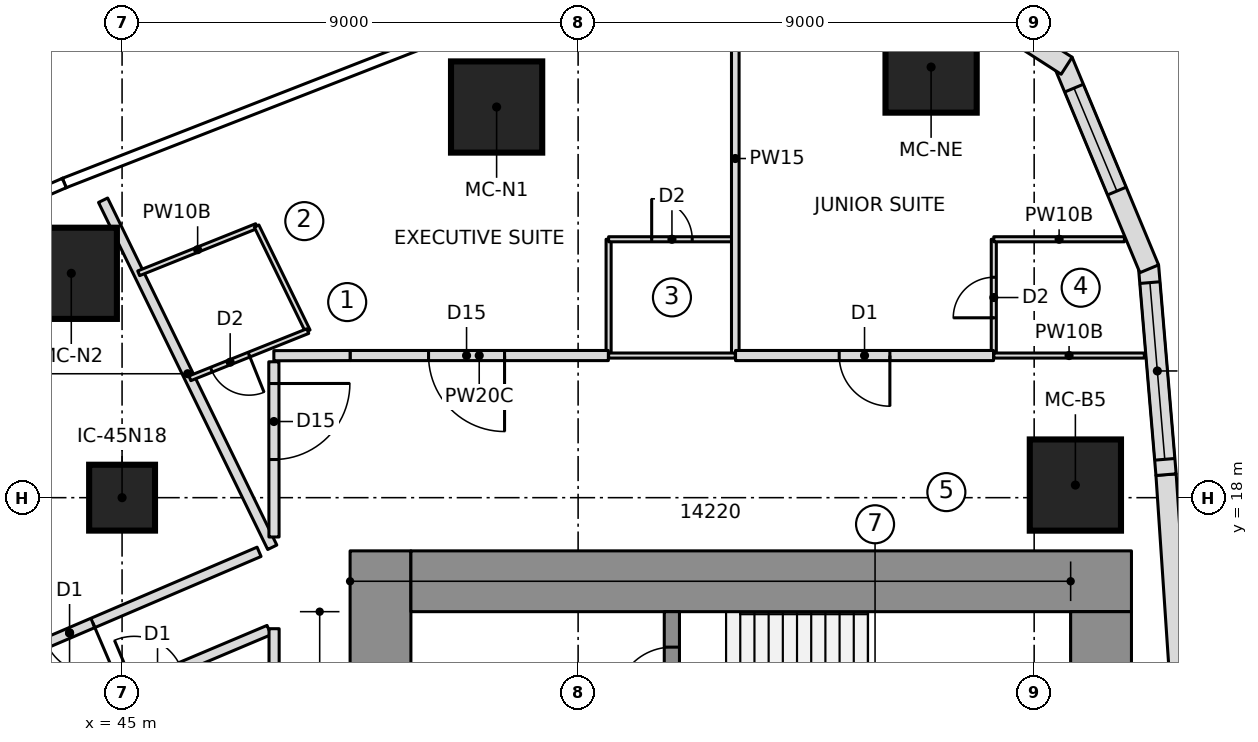
"""IFC4 building model, lengths in metres.
Left out: names, types, materials, properties, quantities, classifications, styles, units other than length and angle.
Written with IfcOpenShell. Run it as: python <this file> out.ifc"""

import sys

from ifc_helpers import new_model, si_unit, direction, frame, frame_2d, origin, origin_2d, place, context, subcontext, project, spatial, polyline, rectangle, outline, extrude, element, fill, save


model = new_model("IFC4")
c1 = context("Model", 3, precision=1e-05, world=origin(), true_north=direction((0.0, 1.0)))
c2 = subcontext(c1, "Body", "Model", "MODEL_VIEW")
j1 = project(units=[si_unit("LENGTHUNIT", "METRE"), si_unit("PLANEANGLEUNIT", "RADIAN")], contexts=[c1])
p1 = place(None, origin())
s1 = spatial("IfcSite", under=j1, at=p1, CompositionType="ELEMENT")
p2 = place(p1, origin())
s2 = spatial("IfcBuilding", under=s1, at=p2, CompositionType="ELEMENT")
p3 = place(p2, frame((0.0, 0.0, 53.8)))
s3 = spatial("IfcBuildingStorey", under=s2, at=p3, CompositionType="ELEMENT", Elevation=53.8)
p4 = place(p3, frame((50.1, 6.65, 0.0), z_axis=(0.0, 0.0, 1.0), x_axis=(0.0, 1.0, 0.0)))
e1 = element("IfcWall", 1, at=p4, inside=s3, PredefinedType="SHEAR", context=c2, shape_type="SweptSolid", body=[
    extrude(rectangle(XDim=10.3, YDim=1.2, at=frame_2d((5.15, 0.0))), origin(), (0.0, 0.0, 1.0), 3.55),
])
p5 = place(p4, frame((6.5, 0.0, 0.0)))
e2 = element("IfcOpeningElement", 2, at=p5, cuts=e1, PredefinedType="OPENING", context=c2, shape_type="SweptSolid", body=[
    extrude(rectangle(XDim=1.1, YDim=2.1, at=frame_2d((0.55, 1.05))), frame((0.0, 0.61, 0.0), z_axis=(0.0, -1.0, 0.0), x_axis=(1.0, 0.0, 0.0)), (0.0, 0.0, 1.0), 1.22),
])
p6 = place(p3, frame((50.7, 16.35, 0.0), z_axis=(0.0, 0.0, 1.0), x_axis=(1.0, 0.0, 0.0)))
e3 = element("IfcWall", 3, at=p6, inside=s3, PredefinedType="SHEAR", context=c2, shape_type="SweptSolid", body=[
    extrude(rectangle(XDim=14.22, YDim=1.2, at=frame_2d((7.11, 0.0))), origin(), (0.0, 0.0, 1.0), 3.55),
])
p7 = place(p3, frame((64.32, 9.95, 0.0), z_axis=(0.0, 0.0, 1.0), x_axis=(0.0, 1.0, 0.0)))
e4 = element("IfcWall", 4, at=p7, inside=s3, PredefinedType="SHEAR", context=c2, shape_type="SweptSolid", body=[
    extrude(rectangle(XDim=5.8, YDim=1.2, at=frame_2d((2.9, 0.0))), origin(), (0.0, 0.0, 1.0), 3.55),
])
p8 = place(p3, frame((55.85, 10.35, 0.0), z_axis=(0.0, 0.0, 1.0), x_axis=(0.0, 1.0, 0.0)))
e5 = element("IfcWall", 5, at=p8, inside=s3, PredefinedType="SHEAR", context=c2, shape_type="SweptSolid", body=[
    extrude(rectangle(XDim=5.4, YDim=0.3, at=frame_2d((2.7, 0.0))), origin(), (0.0, 0.0, 1.0), 3.55),
])
p9 = place(p8, frame((1.43, 0.0, 0.0)))
e6 = element("IfcOpeningElement", 6, at=p9, cuts=e5, PredefinedType="OPENING", context=c2, shape_type="SweptSolid", body=[
    extrude(rectangle(XDim=1.1, YDim=2.1, at=frame_2d((0.55, 1.05))), frame((0.0, 0.16, 0.0), z_axis=(0.0, -1.0, 0.0), x_axis=(1.0, 0.0, 0.0)), (0.0, 0.0, 1.0), 0.32),
])
p10 = place(p8, frame((3.6, 0.0, 0.0)))
e7 = element("IfcOpeningElement", 7, at=p10, cuts=e5, PredefinedType="OPENING", context=c2, shape_type="SweptSolid", body=[
    extrude(rectangle(XDim=1.1, YDim=2.1, at=frame_2d((0.55, 1.05))), frame((0.0, 0.16, 0.0), z_axis=(0.0, -1.0, 0.0), x_axis=(1.0, 0.0, 0.0)), (0.0, 0.0, 1.0), 0.32),
])
for number, where, z_axis, x_axis in (
    (8, (63.813, 18.249, 0.0), (0.0, 0.0, 1.0), (1.0, 0.0, 0.0)),
    (9, (60.966, 26.499, 0.0), (0.0, 0.0, 1.0), (1.0, 0.0, 0.0)),
    (10, (52.392, 25.71, 0.0), (0.0, 0.0, 1.0), (1.0, 0.0, 0.0)),
    (11, (43.998, 22.428, 0.0), (0.0, 0.0, 1.0), (1.0, 0.0, 0.0)),
):
    element("IfcColumn", number, at=place(p3, frame(where, z_axis=z_axis, x_axis=x_axis)), inside=s3, PredefinedType="COLUMN", context=c2, shape_type="SweptSolid", body=[
        extrude(rectangle(XDim=1.8, YDim=1.8, at=origin_2d()), origin(), (0.0, 0.0, 1.0), 3.55),
    ])
p11 = place(p3, frame((45.0, 18.0, 0.0), z_axis=(0.0, 0.0, 1.0), x_axis=(1.0, 0.0, 0.0)))
e12 = element("IfcColumn", 12, at=p11, inside=s3, PredefinedType="COLUMN", context=c2, shape_type="SweptSolid", body=[
    extrude(rectangle(XDim=1.3, YDim=1.3, at=origin_2d()), origin(), (0.0, 0.0, 1.0), 3.55),
])
p12 = place(p3, frame((65.878, 14.36, 0.0), z_axis=(0.0, 0.0, 1.0), x_axis=(-0.067087430225, 0.997747100575, 0.0)))
e13 = element("IfcWall", 13, at=p12, inside=s3, PredefinedType="NOTDEFINED", context=c2, shape_type="SweptSolid", body=[
    extrude(outline(polyline([(-0.002, -0.2), (4.107, -0.2), (4.103, 0.2), (0.002, 0.2), (-0.002, -0.2)])), origin(), (0.0, 0.0, 1.0), 3.25),
])
p13 = place(p3, frame((65.603, 18.455, 0.0), z_axis=(0.0, 0.0, 1.0), x_axis=(-0.083793550906, 0.996483136248, 0.0)))
e14 = element("IfcWall", 14, at=p13, inside=s3, PredefinedType="NOTDEFINED", context=c2, shape_type="SweptSolid", body=[
    extrude(outline(polyline([(-0.002, -0.2), (4.136, -0.2), (4.074, 0.2), (0.002, 0.2), (-0.002, -0.2)])), origin(), (0.0, 0.0, 1.0), 3.25),
])
p14 = place(p13, frame((0.302, 0.0, 0.9)))
e15 = element("IfcOpeningElement", 15, at=p14, cuts=e14, PredefinedType="OPENING", context=c2, shape_type="SweptSolid", body=[
    extrude(rectangle(XDim=3.5, YDim=1.8, at=frame_2d((1.75, 0.9))), frame((0.0, 0.21, 0.0), z_axis=(0.0, -1.0, 0.0), x_axis=(1.0, 0.0, 0.0)), (0.0, 0.0, 1.0), 0.42),
])
p15 = place(p3, frame((65.259, 22.546, 0.0), z_axis=(0.0, 0.0, 1.0), x_axis=(-0.384372042685, 0.923178277908, 0.0)))
e16 = element("IfcWall", 16, at=p15, inside=s3, PredefinedType="NOTDEFINED", context=c2, shape_type="SweptSolid", body=[
    extrude(outline(polyline([(-0.031, -0.2), (4.408, -0.2), (4.283, 0.2), (0.031, 0.2), (-0.031, -0.2)])), origin(), (0.0, 0.0, 1.0), 3.25),
])
p16 = place(p15, frame((1.631, 0.0, 0.6)))
e17 = element("IfcOpeningElement", 17, at=p16, cuts=e16, PredefinedType="OPENING", context=c2, shape_type="SweptSolid", body=[
    extrude(outline(polyline([(0.0, 1.35), (0.084, 1.771), (0.322, 2.128), (0.679, 2.366), (1.1, 2.45), (1.521, 2.366), (1.878, 2.128), (2.116, 1.771), (2.2, 1.35), (2.2, 1.1), (2.116, 0.679), (1.878, 0.322), (1.521, 0.084), (1.1, 0.0), (0.679, 0.084), (0.322, 0.322), (0.084, 0.679), (0.0, 1.1), (0.0, 1.35)])), frame((0.0, 0.21, 0.0), z_axis=(0.0, -1.0, 0.0), x_axis=(1.0, 0.0, 0.0)), (0.0, 0.0, 1.0), 0.42),
])
p17 = place(p3, frame((63.588, 26.558, 0.0), z_axis=(0.0, 0.0, 1.0), x_axis=(-0.840937468718, 0.541132307025, 0.0)))
e18 = element("IfcWall", 18, at=p17, inside=s3, PredefinedType="NOTDEFINED", context=c2, shape_type="SweptSolid", body=[
    extrude(outline(polyline([(-0.062, -0.2), (4.409, -0.2), (4.284, 0.2), (0.062, 0.2), (-0.062, -0.2)])), origin(), (0.0, 0.0, 1.0), 3.25),
])
p18 = place(p17, frame((1.073, 0.0, 0.6)))
e19 = element("IfcOpeningElement", 19, at=p18, cuts=e18, PredefinedType="OPENING", context=c2, shape_type="SweptSolid", body=[
    extrude(outline(polyline([(0.0, 1.35), (0.084, 1.771), (0.322, 2.128), (0.679, 2.366), (1.1, 2.45), (1.521, 2.366), (1.878, 2.128), (2.116, 1.771), (2.2, 1.35), (2.2, 1.1), (2.116, 0.679), (1.878, 0.322), (1.521, 0.084), (1.1, 0.0), (0.679, 0.084), (0.322, 0.322), (0.084, 0.679), (0.0, 1.1), (0.0, 1.35)])), frame((0.0, 0.21, 0.0), z_axis=(0.0, -1.0, 0.0), x_axis=(1.0, 0.0, 0.0)), (0.0, 0.0, 1.0), 0.42),
])
p19 = place(p3, frame((54.602, 20.8, 0.0), z_axis=(0.0, 0.0, 1.0), x_axis=(0.0, 1.0, 0.0)))
e20 = element("IfcWall", 20, at=p19, inside=s3, PredefinedType="PARTITIONING", context=c2, shape_type="SweptSolid", body=[
    extrude(rectangle(XDim=2.3, YDim=0.1, at=frame_2d((1.15, 0.0))), origin(), (0.0, 0.0, 1.0), 3.25),
])
p20 = place(p3, frame((54.602, 23.1, 0.0), z_axis=(0.0, 0.0, 1.0), x_axis=(1.0, 0.0, 0.0)))
e21 = element("IfcWall", 21, at=p20, inside=s3, PredefinedType="PARTITIONING", context=c2, shape_type="SweptSolid", body=[
    extrude(rectangle(XDim=2.5, YDim=0.1, at=frame_2d((1.25, 0.0))), origin(), (0.0, 0.0, 1.0), 3.25),
])
p21 = place(p20, frame((0.85, 0.0, 0.0)))
e22 = element("IfcOpeningElement", 22, at=p21, cuts=e21, PredefinedType="OPENING", context=c2, shape_type="SweptSolid", body=[
    extrude(rectangle(XDim=0.8, YDim=2.1, at=frame_2d((0.4, 1.05))), frame((0.0, 0.06, 0.0), z_axis=(0.0, -1.0, 0.0), x_axis=(1.0, 0.0, 0.0)), (0.0, 0.0, 1.0), 0.12),
])
p22 = place(p3, frame((62.203, 20.8, 0.0), z_axis=(0.0, 0.0, 1.0), x_axis=(0.0, 1.0, 0.0)))
e23 = element("IfcWall", 23, at=p22, inside=s3, PredefinedType="PARTITIONING", context=c2, shape_type="SweptSolid", body=[
    extrude(rectangle(XDim=2.3, YDim=0.1, at=frame_2d((1.15, 0.0))), origin(), (0.0, 0.0, 1.0), 3.25),
])
p23 = place(p22, frame((0.75, 0.0, 0.0)))
e24 = element("IfcOpeningElement", 24, at=p23, cuts=e23, PredefinedType="OPENING", context=c2, shape_type="SweptSolid", body=[
    extrude(rectangle(XDim=0.8, YDim=2.1, at=frame_2d((0.4, 1.05))), frame((0.0, 0.06, 0.0), z_axis=(0.0, -1.0, 0.0), x_axis=(1.0, 0.0, 0.0)), (0.0, 0.0, 1.0), 0.12),
])
p24 = place(p3, frame((62.203, 23.1, 0.0), z_axis=(0.0, 0.0, 1.0), x_axis=(1.0, 0.0, 0.0)))
e25 = element("IfcWall", 25, at=p24, inside=s3, PredefinedType="PARTITIONING", context=c2, shape_type="SweptSolid", body=[
    extrude(rectangle(XDim=2.578, YDim=0.1, at=frame_2d((1.289, 0.0))), origin(), (0.0, 0.0, 1.0), 3.25),
])
p25 = place(p3, frame((57.102, 20.8, 0.0), z_axis=(0.0, 0.0, 1.0), x_axis=(0.0, 1.0, 0.0)))
e26 = element("IfcWall", 26, at=p25, inside=s3, PredefinedType="PARTITIONING", context=c2, shape_type="SweptSolid", body=[
    extrude(rectangle(XDim=7.787, YDim=0.15, at=frame_2d((3.894, 0.0))), origin(), (0.0, 0.0, 1.0), 3.25),
])
p26 = place(p3, frame((47.964, 17.021, 0.0), z_axis=(0.0, 0.0, 1.0), x_axis=(-0.438207101073, 0.898874038211, 0.0)))
e27 = element("IfcWall", 27, at=p26, inside=s3, PredefinedType="PARTITIONING", context=c2, shape_type="SweptSolid", body=[
    extrude(rectangle(XDim=7.62, YDim=0.2, at=frame_2d((3.81, 0.0))), origin(), (0.0, 0.0, 1.0), 3.25),
])
p27 = place(p3, frame((45.328, 22.428, 0.0), z_axis=(0.0, 0.0, 1.0), x_axis=(0.928288495333, 0.371860819975, 0.0)))
e28 = element("IfcWall", 28, at=p27, inside=s3, PredefinedType="PARTITIONING", context=c2, shape_type="SweptSolid", body=[
    extrude(rectangle(XDim=2.507, YDim=0.1, at=frame_2d((1.253, 0.0))), origin(), (0.0, 0.0, 1.0), 3.25),
])
p28 = place(p3, frame((47.655, 23.361, 0.0), z_axis=(0.0, 0.0, 1.0), x_axis=(0.438171240168, -0.898891519756, 0.0)))
e29 = element("IfcWall", 29, at=p28, inside=s3, PredefinedType="PARTITIONING", context=c2, shape_type="SweptSolid", body=[
    extrude(rectangle(XDim=2.306, YDim=0.1, at=frame_2d((1.153, 0.0))), origin(), (0.0, 0.0, 1.0), 3.25),
])
p29 = place(p3, frame((48.665, 21.288, 0.0), z_axis=(0.0, 0.0, 1.0), x_axis=(-0.928288495333, -0.371860819975, 0.0)))
e30 = element("IfcWall", 30, at=p29, inside=s3, PredefinedType="PARTITIONING", context=c2, shape_type="SweptSolid", body=[
    extrude(rectangle(XDim=2.507, YDim=0.1, at=frame_2d((1.253, 0.0))), origin(), (0.0, 0.0, 1.0), 3.25),
])
p30 = place(p29, frame((1.25, 0.0, 0.0)))
e31 = element("IfcOpeningElement", 31, at=p30, cuts=e30, PredefinedType="OPENING", context=c2, shape_type="SweptSolid", body=[
    extrude(rectangle(XDim=0.8, YDim=2.1, at=frame_2d((0.4, 1.05))), frame((0.0, 0.06, 0.0), z_axis=(0.0, -1.0, 0.0), x_axis=(1.0, 0.0, 0.0)), (0.0, 0.0, 1.0), 0.12),
])
p31 = place(p3, frame((43.85, 13.677, 0.0), z_axis=(0.0, 0.0, 1.0), x_axis=(0.921265924084, 0.388933281068, 0.0)))
e32 = element("IfcWall", 32, at=p31, inside=s3, PredefinedType="PARTITIONING", context=c2, shape_type="SweptSolid", body=[
    extrude(rectangle(XDim=4.396, YDim=0.2, at=frame_2d((2.198, 0.0))), origin(), (0.0, 0.0, 1.0), 3.25),
])
p32 = place(p31, frame((1.508, 0.0, 0.0)))
e33 = element("IfcOpeningElement", 33, at=p32, cuts=e32, PredefinedType="OPENING", context=c2, shape_type="SweptSolid", body=[
    extrude(rectangle(XDim=1.0, YDim=2.1, at=frame_2d((0.5, 1.05))), frame((0.0, 0.11, 0.0), z_axis=(0.0, -1.0, 0.0), x_axis=(1.0, 0.0, 0.0)), (0.0, 0.0, 1.0), 0.22),
])
p33 = place(p3, frame((54.597, 20.805, 0.0), z_axis=(0.0, 0.0, 1.0), x_axis=(-1.0, 0.0, 0.0)))
e34 = element("IfcWall", 34, at=p33, inside=s3, PredefinedType="PARTITIONING", context=c2, shape_type="SweptSolid", body=[
    extrude(rectangle(XDim=5.097, YDim=0.2, at=frame_2d((2.548, 0.0))), origin(), (0.0, 0.0, 1.0), 3.25),
])
p34 = place(p33, frame((2.048, 0.0, 0.0)))
e35 = element("IfcOpeningElement", 35, at=p34, cuts=e34, PredefinedType="OPENING", context=c2, shape_type="SweptSolid", body=[
    extrude(rectangle(XDim=1.5, YDim=2.1, at=frame_2d((0.75, 1.05))), frame((0.0, 0.11, 0.0), z_axis=(0.0, -1.0, 0.0), x_axis=(1.0, 0.0, 0.0)), (0.0, 0.0, 1.0), 0.22),
])
p35 = place(p3, frame((62.198, 20.805, 0.0), z_axis=(0.0, 0.0, 1.0), x_axis=(-1.0, 0.0, 0.0)))
e36 = element("IfcWall", 36, at=p35, inside=s3, PredefinedType="PARTITIONING", context=c2, shape_type="SweptSolid", body=[
    extrude(rectangle(XDim=5.092, YDim=0.2, at=frame_2d((2.546, 0.0))), origin(), (0.0, 0.0, 1.0), 3.25),
])
p36 = place(p35, frame((2.046, 0.0, 0.0)))
e37 = element("IfcOpeningElement", 37, at=p36, cuts=e36, PredefinedType="OPENING", context=c2, shape_type="SweptSolid", body=[
    extrude(rectangle(XDim=1.0, YDim=2.1, at=frame_2d((0.5, 1.05))), frame((0.0, 0.11, 0.0), z_axis=(0.0, -1.0, 0.0), x_axis=(1.0, 0.0, 0.0)), (0.0, 0.0, 1.0), 0.22),
])
p37 = place(p3, frame((57.102, 20.805, 0.0), z_axis=(0.0, 0.0, 1.0), x_axis=(-1.0, 0.0, 0.0)))
e38 = element("IfcWall", 38, at=p37, inside=s3, PredefinedType="PARTITIONING", context=c2, shape_type="SweptSolid", body=[
    extrude(rectangle(XDim=2.5, YDim=0.1, at=frame_2d((1.25, 0.0))), origin(), (0.0, 0.0, 1.0), 3.25),
])
p38 = place(p3, frame((65.175, 20.805, 0.0), z_axis=(0.0, 0.0, 1.0), x_axis=(-1.0, 0.0, 0.0)))
e39 = element("IfcWall", 39, at=p38, inside=s3, PredefinedType="PARTITIONING", context=c2, shape_type="SweptSolid", body=[
    extrude(rectangle(XDim=2.971, YDim=0.1, at=frame_2d((1.486, 0.0))), origin(), (0.0, 0.0, 1.0), 3.25),
])
p39 = place(p3, frame((47.704, 16.931, 0.0), z_axis=(0.0, 0.0, 1.0), x_axis=(-0.919360612497, -0.39341589214, 0.0)))
e40 = element("IfcWall", 40, at=p39, inside=s3, PredefinedType="PARTITIONING", context=c2, shape_type="SweptSolid", body=[
    extrude(rectangle(XDim=8.137, YDim=0.2, at=frame_2d((4.068, 0.0))), origin(), (0.0, 0.0, 1.0), 3.25),
])
p40 = place(p39, frame((3.568, 0.0, 0.0)))
e41 = element("IfcOpeningElement", 41, at=p40, cuts=e40, PredefinedType="OPENING", context=c2, shape_type="SweptSolid", body=[
    extrude(rectangle(XDim=1.0, YDim=2.1, at=frame_2d((0.5, 1.05))), frame((0.0, 0.11, 0.0), z_axis=(0.0, -1.0, 0.0), x_axis=(1.0, 0.0, 0.0)), (0.0, 0.0, 1.0), 0.22),
])
p41 = place(p3, frame((48.0, 15.414, 0.0), z_axis=(0.0, 0.0, 1.0), x_axis=(0.0, -1.0, 0.0)))
e42 = element("IfcWall", 42, at=p41, inside=s3, PredefinedType="PARTITIONING", context=c2, shape_type="SweptSolid", body=[
    extrude(rectangle(XDim=30.828, YDim=0.2, at=frame_2d((15.414, 0.0))), origin(), (0.0, 0.0, 1.0), 3.25),
])
p42 = place(p3, frame((49.5, 20.805, 0.0), z_axis=(0.0, 0.0, 1.0), x_axis=(-0.999998104399, -0.001947099992, 0.0)))
e43 = element("IfcWall", 43, at=p42, inside=s3, PredefinedType="PARTITIONING", context=c2, shape_type="SweptSolid", body=[
    extrude(rectangle(XDim=1.505, YDim=0.2, at=frame_2d((0.752, 0.0))), origin(), (0.0, 0.0, 1.0), 3.25),
])
p43 = place(p3, frame((47.996, 20.682, 0.0), z_axis=(0.0, 0.0, 1.0), x_axis=(0.000847217996, -0.999999641111, 0.0)))
e44 = element("IfcWall", 44, at=p43, inside=s3, PredefinedType="PARTITIONING", context=c2, shape_type="SweptSolid", body=[
    extrude(rectangle(XDim=3.458, YDim=0.2, at=frame_2d((1.729, 0.0))), origin(), (0.0, 0.0, 1.0), 3.25),
])
p44 = place(p43, frame((0.429, 0.0, 0.0)))
e45 = element("IfcOpeningElement", 45, at=p44, cuts=e44, PredefinedType="OPENING", context=c2, shape_type="SweptSolid", body=[
    extrude(rectangle(XDim=1.5, YDim=2.1, at=frame_2d((0.75, 1.05))), frame((0.0, 0.11, 0.0), z_axis=(0.0, -1.0, 0.0), x_axis=(1.0, 0.0, 0.0)), (0.0, 0.0, 1.0), 0.22),
])
p45 = place(p14, origin())
e46 = element("IfcWindow", 46, at=p45, inside=s3, PartitioningType="SINGLE_PANEL", PredefinedType="WINDOW", context=c2, shape_type="SweptSolid", body=[
    extrude(rectangle(XDim=3.5, YDim=1.8, at=frame_2d((1.75, 0.9))), frame((0.0, 0.17, 0.0), z_axis=(0.0, -1.0, 0.0), x_axis=(1.0, 0.0, 0.0)), (0.0, 0.0, 1.0), 0.06),
])
fill(e15, e46)
p46 = place(p16, origin())
e47 = element("IfcWindow", 47, at=p46, inside=s3, PartitioningType="SINGLE_PANEL", PredefinedType="WINDOW", context=c2, shape_type="SweptSolid", body=[
    extrude(outline(polyline([(0.0, 1.35), (0.084, 1.771), (0.322, 2.128), (0.679, 2.366), (1.1, 2.45), (1.521, 2.366), (1.878, 2.128), (2.116, 1.771), (2.2, 1.35), (2.2, 1.1), (2.116, 0.679), (1.878, 0.322), (1.521, 0.084), (1.1, 0.0), (0.679, 0.084), (0.322, 0.322), (0.084, 0.679), (0.0, 1.1), (0.0, 1.35)])), frame((0.0, 0.17, 0.0), z_axis=(0.0, -1.0, 0.0), x_axis=(1.0, 0.0, 0.0)), (0.0, 0.0, 1.0), 0.06),
])
fill(e17, e47)
p47 = place(p21, origin())
e48 = element("IfcDoor", 48, at=p47, inside=s3, OperationType="SINGLE_SWING_LEFT", PredefinedType="DOOR", context=c2, shape_type="SweptSolid", body=[
    extrude(rectangle(XDim=0.8, YDim=2.1, at=frame_2d((0.4, 1.05))), frame((0.0, 0.025, 0.0), z_axis=(0.0, -1.0, 0.0), x_axis=(1.0, 0.0, 0.0)), (0.0, 0.0, 1.0), 0.05),
])
fill(e22, e48)
p48 = place(p23, origin())
e49 = element("IfcDoor", 49, at=p48, inside=s3, OperationType="SINGLE_SWING_LEFT", PredefinedType="DOOR", context=c2, shape_type="SweptSolid", body=[
    extrude(rectangle(XDim=0.8, YDim=2.1, at=frame_2d((0.4, 1.05))), frame((0.0, 0.025, 0.0), z_axis=(0.0, -1.0, 0.0), x_axis=(1.0, 0.0, 0.0)), (0.0, 0.0, 1.0), 0.05),
])
fill(e24, e49)
p49 = place(p40, origin())
e50 = element("IfcDoor", 50, at=p49, inside=s3, OperationType="SINGLE_SWING_LEFT", PredefinedType="DOOR", context=c2, shape_type="SweptSolid", body=[
    extrude(rectangle(XDim=1.0, YDim=2.1, at=frame_2d((0.5, 1.05))), frame((0.0, 0.025, 0.0), z_axis=(0.0, -1.0, 0.0), x_axis=(1.0, 0.0, 0.0)), (0.0, 0.0, 1.0), 0.05),
])
fill(e41, e50)
p50 = place(p30, origin())
e51 = element("IfcDoor", 51, at=p50, inside=s3, OperationType="SINGLE_SWING_LEFT", PredefinedType="DOOR", context=c2, shape_type="SweptSolid", body=[
    extrude(rectangle(XDim=0.8, YDim=2.1, at=frame_2d((0.4, 1.05))), frame((0.0, 0.025, 0.0), z_axis=(0.0, -1.0, 0.0), x_axis=(1.0, 0.0, 0.0)), (0.0, 0.0, 1.0), 0.05),
])
fill(e31, e51)
p51 = place(p34, origin())
e52 = element("IfcDoor", 52, at=p51, inside=s3, OperationType="DOUBLE_DOOR_SINGLE_SWING", PredefinedType="DOOR", context=c2, shape_type="SweptSolid", body=[
    extrude(rectangle(XDim=1.5, YDim=2.1, at=frame_2d((0.75, 1.05))), frame((0.0, 0.025, 0.0), z_axis=(0.0, -1.0, 0.0), x_axis=(1.0, 0.0, 0.0)), (0.0, 0.0, 1.0), 0.05),
])
fill(e35, e52)
p52 = place(p36, origin())
e53 = element("IfcDoor", 53, at=p52, inside=s3, OperationType="SINGLE_SWING_LEFT", PredefinedType="DOOR", context=c2, shape_type="SweptSolid", body=[
    extrude(rectangle(XDim=1.0, YDim=2.1, at=frame_2d((0.5, 1.05))), frame((0.0, 0.025, 0.0), z_axis=(0.0, -1.0, 0.0), x_axis=(1.0, 0.0, 0.0)), (0.0, 0.0, 1.0), 0.05),
])
fill(e37, e53)
p53 = place(p44, origin())
e54 = element("IfcDoor", 54, at=p53, inside=s3, OperationType="DOUBLE_DOOR_SINGLE_SWING", PredefinedType="DOOR", context=c2, shape_type="SweptSolid", body=[
    extrude(rectangle(XDim=1.5, YDim=2.1, at=frame_2d((0.75, 1.05))), frame((0.0, 0.025, 0.0), z_axis=(0.0, -1.0, 0.0), x_axis=(1.0, 0.0, 0.0)), (0.0, 0.0, 1.0), 0.05),
])
fill(e45, e54)
p54 = place(p10, origin())
e55 = element("IfcDoor", 55, at=p54, inside=s3, OperationType="SINGLE_SWING_RIGHT", PredefinedType="DOOR", context=c2, shape_type="SweptSolid", body=[
    extrude(rectangle(XDim=1.1, YDim=2.1, at=frame_2d((0.55, 1.05))), frame((0.0, 0.025, 0.0), z_axis=(0.0, -1.0, 0.0), x_axis=(1.0, 0.0, 0.0)), (0.0, 0.0, 1.0), 0.05),
])
fill(e7, e55)
save(model, sys.argv[1])
